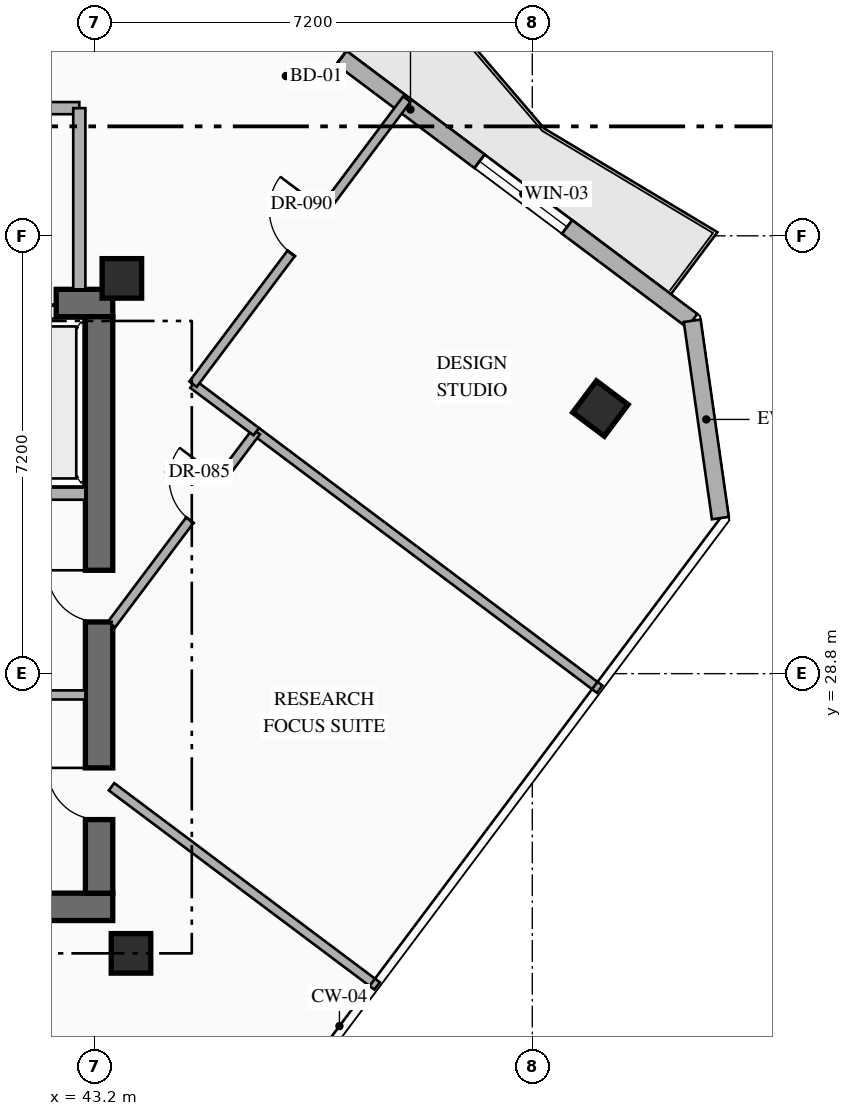
"""IFC4 building model, lengths in metres.
Left out: names, types, materials, properties, quantities, classifications, styles, units other than length and angle.
Written with IfcOpenShell. Run it as: python <this file> out.ifc"""

import sys

from ifc_helpers import new_model, si_unit, direction, frame, frame_2d, origin, origin_2d, place, context, subcontext, project, spatial, rectangle, hollow_rectangle, extrude, element, fill, save


model = new_model("IFC4")
c1 = context("Model", 3, precision=1e-05, world=origin(), true_north=direction((0.0, 1.0)))
c2 = subcontext(c1, "Body", "Model", "MODEL_VIEW")
j1 = project(units=[si_unit("LENGTHUNIT", "METRE"), si_unit("PLANEANGLEUNIT", "RADIAN")], contexts=[c1])
p1 = place(None, origin())
s1 = spatial("IfcSite", under=j1, at=p1, CompositionType="ELEMENT")
p2 = place(p1, origin())
s2 = spatial("IfcBuilding", under=s1, at=p2, CompositionType="ELEMENT")
p3 = place(p2, frame((0.0, 0.0, 246.75)))
s3 = spatial("IfcBuildingStorey", under=s2, at=p3, CompositionType="ELEMENT", Elevation=246.75)
p4 = place(p3, frame((36.04, 24.965, 0.0), z_axis=(0.0, 0.0, 1.0), x_axis=(1.0, 0.0, 0.0)))
e1 = element("IfcWall", 1, at=p4, inside=s3, PredefinedType="SHEAR", context=c2, shape_type="SweptSolid", body=[
    extrude(rectangle(XDim=7.46, YDim=0.45, at=frame_2d((3.73, 0.0))), origin(), (0.0, 0.0, 1.0), 3.6),
])
p5 = place(p3, frame((36.04, 34.895, 0.0), z_axis=(0.0, 0.0, 1.0), x_axis=(1.0, 0.0, 0.0)))
e2 = element("IfcWall", 2, at=p5, inside=s3, PredefinedType="SHEAR", context=c2, shape_type="SweptSolid", body=[
    extrude(rectangle(XDim=7.46, YDim=0.45, at=frame_2d((3.73, 0.0))), origin(), (0.0, 0.0, 1.0), 3.6),
])
p6 = place(p5, frame((2.51, 0.0, 0.0)))
e3 = element("IfcOpeningElement", 3, at=p6, cuts=e2, PredefinedType="OPENING", context=c2, shape_type="SweptSolid", body=[
    extrude(rectangle(XDim=1.1, YDim=2.2, at=frame_2d((0.55, 1.1))), frame((0.0, 0.235, 0.0), z_axis=(0.0, -1.0, 0.0), x_axis=(1.0, 0.0, 0.0)), (0.0, 0.0, 1.0), 0.47),
])
p7 = place(p5, frame((5.41, 0.0, 0.0)))
e4 = element("IfcOpeningElement", 4, at=p7, cuts=e2, PredefinedType="OPENING", context=c2, shape_type="SweptSolid", body=[
    extrude(rectangle(XDim=1.12, YDim=2.15, at=frame_2d((0.56, 1.075))), frame((0.0, 0.235, 0.0), z_axis=(0.0, -1.0, 0.0), x_axis=(1.0, 0.0, 0.0)), (0.0, 0.0, 1.0), 0.47),
])
p8 = place(p3, frame((43.275, 25.19, 0.0), z_axis=(0.0, 0.0, 1.0), x_axis=(0.0, 1.0, 0.0)))
e5 = element("IfcWall", 5, at=p8, inside=s3, PredefinedType="SHEAR", context=c2, shape_type="SweptSolid", body=[
    extrude(rectangle(XDim=9.48, YDim=0.45, at=frame_2d((4.74, 0.0))), origin(), (0.0, 0.0, 1.0), 3.6),
])
p9 = place(p8, frame((1.21, 0.0, 0.0)))
e6 = element("IfcOpeningElement", 6, at=p9, cuts=e5, PredefinedType="OPENING", context=c2, shape_type="SweptSolid", body=[
    extrude(rectangle(XDim=0.85, YDim=2.08, at=frame_2d((0.425, 1.04))), frame((0.0, 0.235, 0.0), z_axis=(0.0, -1.0, 0.0), x_axis=(1.0, 0.0, 0.0)), (0.0, 0.0, 1.0), 0.47),
])
p10 = place(p8, frame((4.46, 0.0, 0.0)))
e7 = element("IfcOpeningElement", 7, at=p10, cuts=e5, PredefinedType="OPENING", context=c2, shape_type="SweptSolid", body=[
    extrude(rectangle(XDim=0.85, YDim=2.08, at=frame_2d((0.425, 1.04))), frame((0.0, 0.235, 0.0), z_axis=(0.0, -1.0, 0.0), x_axis=(1.0, 0.0, 0.0)), (0.0, 0.0, 1.0), 0.47),
])
for number, where, z_axis, x_axis in (
    (8, (43.8, 24.2, 0.0), (0.0, 0.0, 1.0), (1.0, 0.0, 0.0)),
    (9, (43.65, 35.3, 0.0), (0.0, 0.0, 1.0), (1.0, 0.0, 0.0)),
    (10, (51.52, 33.16, 0.0), (0.0, 0.0, 1.0), (0.8, -0.6, 0.0)),
):
    element("IfcColumn", number, at=place(p3, frame(where, z_axis=z_axis, x_axis=x_axis)), inside=s3, PredefinedType="COLUMN", context=c2, shape_type="SweptSolid", body=[
        extrude(hollow_rectangle(XDim=0.65, YDim=0.65, WallThickness=0.025, at=origin_2d()), origin(), (0.0, 0.0, 1.0), 3.6),
    ])
p11 = place(p3, frame((44.86, 40.73, 0.0), z_axis=(0.0, 0.0, 1.0), x_axis=(0.800022950109, -0.599969398635, 0.0)))
e11 = element("IfcWall", 11, at=p11, inside=s3, PredefinedType="STANDARD", context=c2, shape_type="SweptSolid", body=[
    extrude(rectangle(XDim=10.212, YDim=0.28, at=frame_2d((5.106, 0.0))), origin(), (0.0, 0.0, 1.0), 3.35),
])
p12 = place(p11, frame((1.901, 0.0, 0.0)))
e12 = element("IfcOpeningElement", 12, at=p12, cuts=e11, PredefinedType="OPENING", context=c2, shape_type="SweptSolid", body=[
    extrude(rectangle(XDim=1.1, YDim=2.2, at=frame_2d((0.55, 1.1))), frame((0.0, 0.15, 0.0), z_axis=(0.0, -1.0, 0.0), x_axis=(1.0, 0.0, 0.0)), (0.0, 0.0, 1.0), 0.3),
])
p13 = place(p11, frame((5.84, 0.0, 0.85)))
e13 = element("IfcOpeningElement", 13, at=p13, cuts=e11, PredefinedType="OPENING", context=c2, shape_type="SweptSolid", body=[
    extrude(rectangle(XDim=1.8, YDim=2.1, at=frame_2d((0.9, 1.05))), frame((0.0, 0.15, 0.0), z_axis=(0.0, -1.0, 0.0), x_axis=(1.0, 0.0, 0.0)), (0.0, 0.0, 1.0), 0.3),
])
p14 = place(p3, frame((53.03, 34.603, 0.0), z_axis=(0.0, 0.0, 1.0), x_axis=(0.141212810973, -0.989979263428, 0.0)))
e14 = element("IfcWall", 14, at=p14, inside=s3, PredefinedType="STANDARD", context=c2, shape_type="SweptSolid", body=[
    extrude(rectangle(XDim=3.278, YDim=0.28, at=frame_2d((1.639, 0.0))), origin(), (0.0, 0.0, 1.0), 3.35),
])
p15 = place(p3, frame((40.97, 31.76, 0.0), z_axis=(0.0, 0.0, 1.0), x_axis=(1.0, 0.0, 0.0)))
e15 = element("IfcWall", 15, at=p15, inside=s3, PredefinedType="STANDARD", context=c2, shape_type="SweptSolid", body=[
    extrude(rectangle(XDim=2.08, YDim=0.2, at=frame_2d((1.04, 0.0))), origin(), (0.0, 0.0, 1.0), 3.35),
])
p16 = place(p3, frame((40.97, 28.45, 0.0), z_axis=(0.0, 0.0, 1.0), x_axis=(1.0, 0.0, 0.0)))
e16 = element("IfcWall", 16, at=p16, inside=s3, PredefinedType="PARTITIONING", context=c2, shape_type="SweptSolid", body=[
    extrude(rectangle(XDim=2.08, YDim=0.15, at=frame_2d((1.04, 0.0))), origin(), (0.0, 0.0, 1.0), 3.35),
])
p17 = place(p3, frame((37.65, 38.1, 0.0), z_axis=(0.0, 0.0, 1.0), x_axis=(1.0, 0.0, 0.0)))
e17 = element("IfcWall", 17, at=p17, inside=s3, PredefinedType="STANDARD", context=c2, shape_type="SweptSolid", body=[
    extrude(rectangle(XDim=5.3, YDim=0.2, at=frame_2d((2.65, 0.0))), origin(), (0.0, 0.0, 1.0), 3.35),
])
p18 = place(p3, frame((42.95, 35.12, 0.0), z_axis=(0.0, 0.0, 1.0), x_axis=(0.0, 1.0, 0.0)))
e18 = element("IfcWall", 18, at=p18, inside=s3, PredefinedType="STANDARD", context=c2, shape_type="SweptSolid", body=[
    extrude(rectangle(XDim=2.98, YDim=0.2, at=frame_2d((1.49, 0.0))), origin(), (0.0, 0.0, 1.0), 3.35),
])
p19 = place(p3, frame((43.48, 26.94, 0.0), z_axis=(0.0, 0.0, 1.0), x_axis=(0.80000536583, -0.599992845493, 0.0)))
e19 = element("IfcWall", 19, at=p19, inside=s3, PredefinedType="PARTITIONING", context=c2, shape_type="SweptSolid", body=[
    extrude(rectangle(XDim=5.46, YDim=0.15, at=frame_2d((2.73, 0.0))), origin(), (0.0, 0.0, 1.0), 3.35),
])
p20 = place(p3, frame((45.86, 32.78, 0.0), z_axis=(0.0, 0.0, 1.0), x_axis=(0.799991700537, -0.600011065791, 0.0)))
e20 = element("IfcWall", 20, at=p20, inside=s3, PredefinedType="PARTITIONING", context=c2, shape_type="SweptSolid", body=[
    extrude(rectangle(XDim=7.06, YDim=0.15, at=frame_2d((3.53, 0.0))), origin(), (0.0, 0.0, 1.0), 3.35),
])
p21 = place(p3, frame((43.48, 29.607, 0.0), z_axis=(0.0, 0.0, 1.0), x_axis=(0.600049238723, 0.79996306859, 0.0)))
e21 = element("IfcWall", 21, at=p21, inside=s3, PredefinedType="PARTITIONING", context=c2, shape_type="SweptSolid", body=[
    extrude(rectangle(XDim=3.967, YDim=0.15, at=frame_2d((1.983, 0.0))), origin(), (0.0, 0.0, 1.0), 3.35),
])
p22 = place(p21, frame((2.147, 0.0, 0.0)))
e22 = element("IfcOpeningElement", 22, at=p22, cuts=e21, PredefinedType="OPENING", context=c2, shape_type="SweptSolid", body=[
    extrude(rectangle(XDim=0.85, YDim=2.08, at=frame_2d((0.425, 1.04))), frame((0.0, 0.085, 0.0), z_axis=(0.0, -1.0, 0.0), x_axis=(1.0, 0.0, 0.0)), (0.0, 0.0, 1.0), 0.17),
])
p23 = place(p3, frame((44.82, 33.56, 0.0), z_axis=(0.0, 0.0, 1.0), x_axis=(0.8, -0.6, 0.0)))
e23 = element("IfcWall", 23, at=p23, inside=s3, PredefinedType="PARTITIONING", context=c2, shape_type="SweptSolid", body=[
    extrude(rectangle(XDim=1.3, YDim=0.15, at=frame_2d((0.65, 0.0))), origin(), (0.0, 0.0, 1.0), 3.35),
])
p24 = place(p3, frame((44.82, 33.56, 0.0), z_axis=(0.0, 0.0, 1.0), x_axis=(0.599986667805, 0.800009998972, 0.0)))
e24 = element("IfcWall", 24, at=p24, inside=s3, PredefinedType="PARTITIONING", context=c2, shape_type="SweptSolid", body=[
    extrude(rectangle(XDim=5.86, YDim=0.15, at=frame_2d((2.93, 0.0))), origin(), (0.0, 0.0, 1.0), 3.35),
])
p25 = place(p24, frame((2.69, 0.0, 0.0)))
e25 = element("IfcOpeningElement", 25, at=p25, cuts=e24, PredefinedType="OPENING", context=c2, shape_type="SweptSolid", body=[
    extrude(rectangle(XDim=0.9, YDim=2.15, at=frame_2d((0.45, 1.075))), frame((0.0, 0.085, 0.0), z_axis=(0.0, -1.0, 0.0), x_axis=(1.0, 0.0, 0.0)), (0.0, 0.0, 1.0), 0.17),
])
p26 = place(p12, origin())
e26 = element("IfcDoor", 26, at=p26, inside=s3, OperationType="SINGLE_SWING_LEFT", PredefinedType="DOOR", context=c2, shape_type="SweptSolid", body=[
    extrude(rectangle(XDim=1.1, YDim=2.2, at=frame_2d((0.55, 1.1))), frame((0.0, 0.025, 0.0), z_axis=(0.0, -1.0, 0.0), x_axis=(1.0, 0.0, 0.0)), (0.0, 0.0, 1.0), 0.05),
])
fill(e12, e26)
p27 = place(p13, origin())
e27 = element("IfcWindow", 27, at=p27, inside=s3, PartitioningType="SINGLE_PANEL", PredefinedType="WINDOW", context=c2, shape_type="SweptSolid", body=[
    extrude(rectangle(XDim=1.8, YDim=2.1, at=frame_2d((0.9, 1.05))), frame((0.0, 0.03, 0.0), z_axis=(0.0, -1.0, 0.0), x_axis=(1.0, 0.0, 0.0)), (0.0, 0.0, 1.0), 0.06),
])
fill(e13, e27)
p28 = place(p7, origin())
e28 = element("IfcDoor", 28, at=p28, inside=s3, OperationType="SLIDING_TO_RIGHT", PredefinedType="USERDEFINED", context=c2, shape_type="SweptSolid", body=[
    extrude(rectangle(XDim=1.12, YDim=2.15, at=frame_2d((0.56, 1.075))), frame((0.0, 0.025, 0.0), z_axis=(0.0, -1.0, 0.0), x_axis=(1.0, 0.0, 0.0)), (0.0, 0.0, 1.0), 0.05),
])
fill(e4, e28)
p29 = place(p9, origin())
e29 = element("IfcDoor", 29, at=p29, inside=s3, OperationType="SINGLE_SWING_RIGHT", PredefinedType="DOOR", context=c2, shape_type="SweptSolid", body=[
    extrude(rectangle(XDim=0.85, YDim=2.08, at=frame_2d((0.425, 1.04))), frame((0.0, 0.025, 0.0), z_axis=(0.0, -1.0, 0.0), x_axis=(1.0, 0.0, 0.0)), (0.0, 0.0, 1.0), 0.05),
])
fill(e6, e29)
p30 = place(p10, origin())
e30 = element("IfcDoor", 30, at=p30, inside=s3, OperationType="SINGLE_SWING_RIGHT", PredefinedType="DOOR", context=c2, shape_type="SweptSolid", body=[
    extrude(rectangle(XDim=0.85, YDim=2.08, at=frame_2d((0.425, 1.04))), frame((0.0, 0.025, 0.0), z_axis=(0.0, -1.0, 0.0), x_axis=(1.0, 0.0, 0.0)), (0.0, 0.0, 1.0), 0.05),
])
fill(e7, e30)
p31 = place(p22, origin())
e31 = element("IfcDoor", 31, at=p31, inside=s3, OperationType="SINGLE_SWING_RIGHT", PredefinedType="DOOR", context=c2, shape_type="SweptSolid", body=[
    extrude(rectangle(XDim=0.85, YDim=2.08, at=frame_2d((0.425, 1.04))), frame((0.0, 0.025, 0.0), z_axis=(0.0, -1.0, 0.0), x_axis=(1.0, 0.0, 0.0)), (0.0, 0.0, 1.0), 0.05),
])
fill(e22, e31)
p32 = place(p25, origin())
e32 = element("IfcDoor", 32, at=p32, inside=s3, OperationType="SINGLE_SWING_RIGHT", PredefinedType="DOOR", context=c2, shape_type="SweptSolid", body=[
    extrude(rectangle(XDim=0.9, YDim=2.15, at=frame_2d((0.45, 1.075))), frame((0.0, 0.025, 0.0), z_axis=(0.0, -1.0, 0.0), x_axis=(1.0, 0.0, 0.0)), (0.0, 0.0, 1.0), 0.05),
])
fill(e25, e32)
save(model, sys.argv[1])
